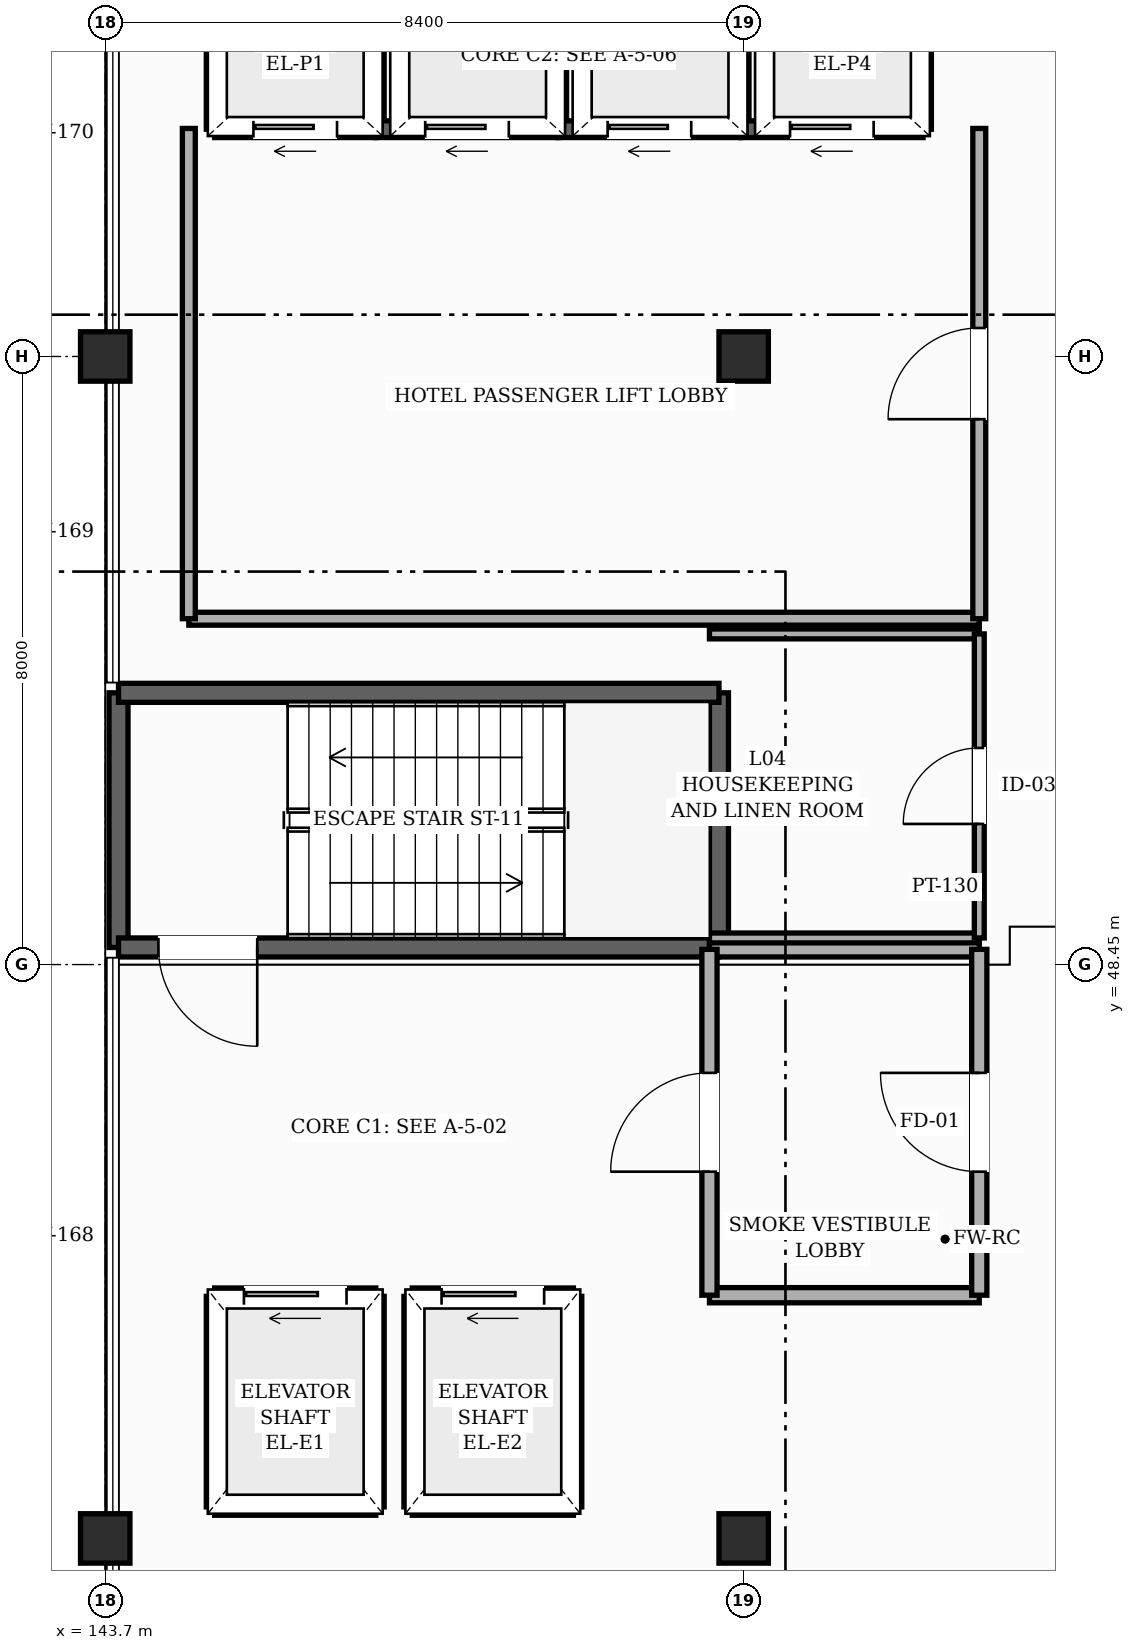
"""IFC4 building model, lengths in metres.
Left out: names, types, materials, properties, quantities, classifications, styles, units other than length and angle.
Written with IfcOpenShell. Run it as: python <this file> out.ifc"""

import sys

from ifc_helpers import new_model, si_unit, direction, frame, frame_2d, origin, origin_2d, place, context, subcontext, project, spatial, rectangle, hollow_rectangle, extrude, element, fill, save


model = new_model("IFC4")
c1 = context("Model", 3, precision=1e-05, world=origin(), true_north=direction((0.0, 1.0)))
c2 = subcontext(c1, "Body", "Model", "MODEL_VIEW")
j1 = project(units=[si_unit("LENGTHUNIT", "METRE"), si_unit("PLANEANGLEUNIT", "RADIAN")], contexts=[c1])
p1 = place(None, origin())
s1 = spatial("IfcSite", under=j1, at=p1, CompositionType="ELEMENT")
p2 = place(p1, origin())
s2 = spatial("IfcBuilding", under=s1, at=p2, CompositionType="ELEMENT")
p3 = place(p2, frame((0.0, 0.0, 19.8)))
s3 = spatial("IfcBuildingStorey", under=s2, at=p3, CompositionType="ELEMENT", Elevation=19.8)
for number, where, z_axis, x_axis in (
    (1, (143.7, 40.9, 0.0), (0.0, 0.0, 1.0), (1.0, 0.0, 0.0)),
    (2, (143.7, 56.45, 0.0), (0.0, 0.0, 1.0), (1.0, 0.0, 0.0)),
    (3, (152.1, 40.9, 0.0), (0.0, 0.0, 1.0), (1.0, 0.0, 0.0)),
    (4, (152.1, 56.45, 0.0), (0.0, 0.0, 1.0), (1.0, 0.0, 0.0)),
):
    element("IfcColumn", number, at=place(p3, frame(where, z_axis=z_axis, x_axis=x_axis)), inside=s3, PredefinedType="COLUMN", context=c2, shape_type="SweptSolid", body=[
        extrude(hollow_rectangle(XDim=0.65, YDim=0.65, WallThickness=0.025, InnerFilletRadius=0.025, OuterFilletRadius=0.05, at=origin_2d()), origin(), (0.0, 0.0, 1.0), 4.8),
    ])
for number, where, z_axis, x_axis in (
    (5, (143.875, 48.675, 0.0), (0.0, 0.0, 1.0), (0.0, 1.0, 0.0)),
    (6, (151.775, 52.025, 0.0), (0.0, 0.0, 1.0), (0.0, -1.0, 0.0)),
):
    element("IfcWall", number, at=place(p3, frame(where, z_axis=z_axis, x_axis=x_axis)), inside=s3, PredefinedType="SHEAR", context=c2, shape_type="SweptSolid", body=[
        extrude(rectangle(XDim=3.35, YDim=0.25, at=frame_2d((1.675, 0.0))), origin(), (0.0, 0.0, 1.0), 4.58),
    ])
p4 = place(p3, frame((151.775, 48.675, 0.0), z_axis=(0.0, 0.0, 1.0), x_axis=(-1.0, 0.0, 0.0)))
e7 = element("IfcWall", 7, at=p4, inside=s3, PredefinedType="SHEAR", context=c2, shape_type="SweptSolid", body=[
    extrude(rectangle(XDim=7.9, YDim=0.25, at=frame_2d((3.95, 0.0))), origin(), (0.0, 0.0, 1.0), 4.58),
])
p5 = place(p4, frame((6.075, 0.0, 0.0)))
e8 = element("IfcOpeningElement", 8, at=p5, cuts=e7, PredefinedType="OPENING", context=c2, shape_type="SweptSolid", body=[
    extrude(rectangle(XDim=1.3, YDim=2.2, at=frame_2d((0.65, 1.1))), frame((0.0, 0.135, 0.0), z_axis=(0.0, -1.0, 0.0), x_axis=(1.0, 0.0, 0.0)), (0.0, 0.0, 1.0), 0.27),
])
p6 = place(p3, frame((143.875, 52.025, 0.0), z_axis=(0.0, 0.0, 1.0), x_axis=(1.0, 0.0, 0.0)))
e9 = element("IfcWall", 9, at=p6, inside=s3, PredefinedType="SHEAR", context=c2, shape_type="SweptSolid", body=[
    extrude(rectangle(XDim=7.9, YDim=0.25, at=frame_2d((3.95, 0.0))), origin(), (0.0, 0.0, 1.0), 4.58),
])
p7 = place(p3, frame((145.14, 44.085, 0.0), z_axis=(0.0, 0.0, 1.0), x_axis=(1.0, 0.0, 0.0)))
e10 = element("IfcWall", 10, at=p7, inside=s3, PredefinedType="SHEAR", context=c2, shape_type="SweptSolid", body=[
    extrude(rectangle(XDim=2.12, YDim=0.22, at=frame_2d((1.06, 0.0))), origin(), (0.0, 0.0, 1.0), 4.58),
])
p8 = place(p7, frame((0.385, 0.0, 0.0)))
e11 = element("IfcOpeningElement", 11, at=p8, cuts=e10, PredefinedType="OPENING", context=c2, shape_type="SweptSolid", body=[
    extrude(rectangle(XDim=1.35, YDim=2.3, at=frame_2d((0.675, 1.15))), frame((0.0, 0.12, 0.0), z_axis=(0.0, -1.0, 0.0), x_axis=(1.0, 0.0, 0.0)), (0.0, 0.0, 1.0), 0.24),
])
p9 = place(p3, frame((145.14, 41.315, 0.0), z_axis=(0.0, 0.0, 1.0), x_axis=(1.0, 0.0, 0.0)))
e12 = element("IfcWall", 12, at=p9, inside=s3, PredefinedType="SHEAR", context=c2, shape_type="SweptSolid", body=[
    extrude(rectangle(XDim=2.12, YDim=0.22, at=frame_2d((1.06, 0.0))), origin(), (0.0, 0.0, 1.0), 4.58),
])
for number, where, z_axis, x_axis in (
    (13, (147.26, 41.315, 0.0), (0.0, 0.0, 1.0), (0.0, 1.0, 0.0)),
    (14, (145.14, 41.315, 0.0), (0.0, 0.0, 1.0), (0.0, 1.0, 0.0)),
):
    element("IfcWall", number, at=place(p3, frame(where, z_axis=z_axis, x_axis=x_axis)), inside=s3, PredefinedType="SHEAR", context=c2, shape_type="SweptSolid", body=[
        extrude(rectangle(XDim=2.77, YDim=0.22, at=frame_2d((1.385, 0.0))), origin(), (0.0, 0.0, 1.0), 4.58),
    ])
p10 = place(p3, frame((147.74, 44.085, 0.0), z_axis=(0.0, 0.0, 1.0), x_axis=(1.0, 0.0, 0.0)))
e15 = element("IfcWall", 15, at=p10, inside=s3, PredefinedType="SHEAR", context=c2, shape_type="SweptSolid", body=[
    extrude(rectangle(XDim=2.12, YDim=0.22, at=frame_2d((1.06, 0.0))), origin(), (0.0, 0.0, 1.0), 4.58),
])
p11 = place(p10, frame((0.385, 0.0, 0.0)))
e16 = element("IfcOpeningElement", 16, at=p11, cuts=e15, PredefinedType="OPENING", context=c2, shape_type="SweptSolid", body=[
    extrude(rectangle(XDim=1.35, YDim=2.3, at=frame_2d((0.675, 1.15))), frame((0.0, 0.12, 0.0), z_axis=(0.0, -1.0, 0.0), x_axis=(1.0, 0.0, 0.0)), (0.0, 0.0, 1.0), 0.24),
])
p12 = place(p3, frame((147.74, 41.315, 0.0), z_axis=(0.0, 0.0, 1.0), x_axis=(1.0, 0.0, 0.0)))
e17 = element("IfcWall", 17, at=p12, inside=s3, PredefinedType="SHEAR", context=c2, shape_type="SweptSolid", body=[
    extrude(rectangle(XDim=2.12, YDim=0.22, at=frame_2d((1.06, 0.0))), origin(), (0.0, 0.0, 1.0), 4.58),
])
for number, where, z_axis, x_axis in (
    (18, (149.86, 41.315, 0.0), (0.0, 0.0, 1.0), (0.0, 1.0, 0.0)),
    (19, (147.74, 41.315, 0.0), (0.0, 0.0, 1.0), (0.0, 1.0, 0.0)),
):
    element("IfcWall", number, at=place(p3, frame(where, z_axis=z_axis, x_axis=x_axis)), inside=s3, PredefinedType="SHEAR", context=c2, shape_type="SweptSolid", body=[
        extrude(rectangle(XDim=2.77, YDim=0.22, at=frame_2d((1.385, 0.0))), origin(), (0.0, 0.0, 1.0), 4.58),
    ])
p13 = place(p3, frame((145.14, 59.44, 0.0), z_axis=(0.0, 0.0, 1.0), x_axis=(1.0, 0.0, 0.0)))
e20 = element("IfcWall", 20, at=p13, inside=s3, PredefinedType="SHEAR", context=c2, shape_type="SweptSolid", body=[
    extrude(rectangle(XDim=2.12, YDim=0.22, at=frame_2d((1.06, 0.0))), origin(), (0.0, 0.0, 1.0), 4.58),
])
p14 = place(p13, frame((0.51, 0.0, 0.0)))
e21 = element("IfcOpeningElement", 21, at=p14, cuts=e20, PredefinedType="OPENING", context=c2, shape_type="SweptSolid", body=[
    extrude(rectangle(XDim=1.1, YDim=2.2, at=frame_2d((0.55, 1.1))), frame((0.0, 0.12, 0.0), z_axis=(0.0, -1.0, 0.0), x_axis=(1.0, 0.0, 0.0)), (0.0, 0.0, 1.0), 0.24),
])
for number, where, z_axis, x_axis in (
    (22, (147.26, 59.44, 0.0), (0.0, 0.0, 1.0), (0.0, 1.0, 0.0)),
    (23, (145.14, 59.44, 0.0), (0.0, 0.0, 1.0), (0.0, 1.0, 0.0)),
):
    element("IfcWall", number, at=place(p3, frame(where, z_axis=z_axis, x_axis=x_axis)), inside=s3, PredefinedType="SHEAR", context=c2, shape_type="SweptSolid", body=[
        extrude(rectangle(XDim=1.92, YDim=0.22, at=frame_2d((0.96, 0.0))), origin(), (0.0, 0.0, 1.0), 4.58),
    ])
p15 = place(p3, frame((147.26, 59.44, 0.0), z_axis=(0.0, 0.0, 1.0), x_axis=(1.0, 0.0, 0.0)))
e24 = element("IfcWall", 24, at=p15, inside=s3, PredefinedType="SHEAR", context=c2, shape_type="SweptSolid", body=[
    extrude(rectangle(XDim=2.4, YDim=0.22, at=frame_2d((1.2, 0.0))), origin(), (0.0, 0.0, 1.0), 4.58),
])
p16 = place(p15, frame((0.65, 0.0, 0.0)))
e25 = element("IfcOpeningElement", 25, at=p16, cuts=e24, PredefinedType="OPENING", context=c2, shape_type="SweptSolid", body=[
    extrude(rectangle(XDim=1.1, YDim=2.2, at=frame_2d((0.55, 1.1))), frame((0.0, 0.12, 0.0), z_axis=(0.0, -1.0, 0.0), x_axis=(1.0, 0.0, 0.0)), (0.0, 0.0, 1.0), 0.24),
])
p17 = place(p3, frame((149.66, 59.44, 0.0), z_axis=(0.0, 0.0, 1.0), x_axis=(0.0, 1.0, 0.0)))
e26 = element("IfcWall", 26, at=p17, inside=s3, PredefinedType="SHEAR", context=c2, shape_type="SweptSolid", body=[
    extrude(rectangle(XDim=1.92, YDim=0.22, at=frame_2d((0.96, 0.0))), origin(), (0.0, 0.0, 1.0), 4.58),
])
p18 = place(p3, frame((149.66, 59.44, 0.0), z_axis=(0.0, 0.0, 1.0), x_axis=(1.0, 0.0, 0.0)))
e27 = element("IfcWall", 27, at=p18, inside=s3, PredefinedType="SHEAR", context=c2, shape_type="SweptSolid", body=[
    extrude(rectangle(XDim=2.4, YDim=0.22, at=frame_2d((1.2, 0.0))), origin(), (0.0, 0.0, 1.0), 4.58),
])
p19 = place(p18, frame((0.65, 0.0, 0.0)))
e28 = element("IfcOpeningElement", 28, at=p19, cuts=e27, PredefinedType="OPENING", context=c2, shape_type="SweptSolid", body=[
    extrude(rectangle(XDim=1.1, YDim=2.2, at=frame_2d((0.55, 1.1))), frame((0.0, 0.12, 0.0), z_axis=(0.0, -1.0, 0.0), x_axis=(1.0, 0.0, 0.0)), (0.0, 0.0, 1.0), 0.24),
])
p20 = place(p3, frame((152.06, 59.44, 0.0), z_axis=(0.0, 0.0, 1.0), x_axis=(0.0, 1.0, 0.0)))
e29 = element("IfcWall", 29, at=p20, inside=s3, PredefinedType="SHEAR", context=c2, shape_type="SweptSolid", body=[
    extrude(rectangle(XDim=1.92, YDim=0.22, at=frame_2d((0.96, 0.0))), origin(), (0.0, 0.0, 1.0), 4.58),
])
p21 = place(p3, frame((152.06, 59.44, 0.0), z_axis=(0.0, 0.0, 1.0), x_axis=(1.0, 0.0, 0.0)))
e30 = element("IfcWall", 30, at=p21, inside=s3, PredefinedType="SHEAR", context=c2, shape_type="SweptSolid", body=[
    extrude(rectangle(XDim=2.4, YDim=0.22, at=frame_2d((1.2, 0.0))), origin(), (0.0, 0.0, 1.0), 4.58),
])
p22 = place(p21, frame((0.65, 0.0, 0.0)))
e31 = element("IfcOpeningElement", 31, at=p22, cuts=e30, PredefinedType="OPENING", context=c2, shape_type="SweptSolid", body=[
    extrude(rectangle(XDim=1.1, YDim=2.2, at=frame_2d((0.55, 1.1))), frame((0.0, 0.12, 0.0), z_axis=(0.0, -1.0, 0.0), x_axis=(1.0, 0.0, 0.0)), (0.0, 0.0, 1.0), 0.24),
])
p23 = place(p3, frame((154.46, 59.44, 0.0), z_axis=(0.0, 0.0, 1.0), x_axis=(0.0, 1.0, 0.0)))
e32 = element("IfcWall", 32, at=p23, inside=s3, PredefinedType="SHEAR", context=c2, shape_type="SweptSolid", body=[
    extrude(rectangle(XDim=1.92, YDim=0.22, at=frame_2d((0.96, 0.0))), origin(), (0.0, 0.0, 1.0), 4.58),
])
for number, where, z_axis, x_axis in (
    (33, (151.65, 44.1, 0.0), (0.0, 0.0, 1.0), (1.0, 0.0, 0.0)),
    (34, (151.65, 48.65, 0.0), (0.0, 0.0, 1.0), (1.0, 0.0, 0.0)),
):
    element("IfcWall", number, at=place(p3, frame(where, z_axis=z_axis, x_axis=x_axis)), inside=s3, PredefinedType="SOLIDWALL", context=c2, shape_type="SweptSolid", body=[
        extrude(rectangle(XDim=3.55, YDim=0.2, at=frame_2d((1.775, 0.0))), origin(), (0.0, 0.0, 1.0), 4.565),
    ])
for number, where, z_axis, x_axis in (
    (35, (151.65, 48.8, 0.0), (0.0, 0.0, 1.0), (1.0, 0.0, 0.0)),
    (36, (151.65, 52.8, 0.0), (0.0, 0.0, 1.0), (1.0, 0.0, 0.0)),
):
    element("IfcWall", number, at=place(p3, frame(where, z_axis=z_axis, x_axis=x_axis)), inside=s3, PredefinedType="PARTITIONING", context=c2, shape_type="SweptSolid", body=[
        extrude(rectangle(XDim=3.55, YDim=0.13, at=frame_2d((1.775, 0.0))), origin(), (0.0, 0.0, 1.0), 4.565),
    ])
p24 = place(p3, frame((144.8, 53.0, 0.0), z_axis=(0.0, 0.0, 1.0), x_axis=(1.0, 0.0, 0.0)))
e37 = element("IfcWall", 37, at=p24, inside=s3, PredefinedType="PARTITIONING", context=c2, shape_type="SweptSolid", body=[
    extrude(rectangle(XDim=10.4, YDim=0.17, at=frame_2d((5.2, 0.0))), origin(), (0.0, 0.0, 1.0), 4.565),
])
p25 = place(p3, frame((144.8, 53.0, 0.0), z_axis=(0.0, 0.0, 1.0), x_axis=(0.0, 1.0, 0.0)))
e38 = element("IfcWall", 38, at=p25, inside=s3, PredefinedType="PARTITIONING", context=c2, shape_type="SweptSolid", body=[
    extrude(rectangle(XDim=6.45, YDim=0.17, at=frame_2d((3.225, 0.0))), origin(), (0.0, 0.0, 1.0), 4.565),
])
p26 = place(p3, frame((151.65, 44.1, 0.0), z_axis=(0.0, 0.0, 1.0), x_axis=(0.0, 1.0, 0.0)))
e39 = element("IfcWall", 39, at=p26, inside=s3, PredefinedType="SOLIDWALL", context=c2, shape_type="SweptSolid", body=[
    extrude(rectangle(XDim=4.55, YDim=0.2, at=frame_2d((2.275, 0.0))), origin(), (0.0, 0.0, 1.0), 4.565),
])
p27 = place(p26, frame((1.625, 0.0, 0.0)))
e40 = element("IfcOpeningElement", 40, at=p27, cuts=e39, PredefinedType="OPENING", context=c2, shape_type="SweptSolid", body=[
    extrude(rectangle(XDim=1.3, YDim=2.2, at=frame_2d((0.65, 1.1))), frame((0.0, 0.11, 0.0), z_axis=(0.0, -1.0, 0.0), x_axis=(1.0, 0.0, 0.0)), (0.0, 0.0, 1.0), 0.22),
])
p28 = place(p3, frame((155.2, 44.1, 0.0), z_axis=(0.0, 0.0, 1.0), x_axis=(0.0, 1.0, 0.0)))
e41 = element("IfcWall", 41, at=p28, inside=s3, PredefinedType="SOLIDWALL", context=c2, shape_type="SweptSolid", body=[
    extrude(rectangle(XDim=4.55, YDim=0.2, at=frame_2d((2.275, 0.0))), origin(), (0.0, 0.0, 1.0), 4.565),
])
p29 = place(p28, frame((1.625, 0.0, 0.0)))
e42 = element("IfcOpeningElement", 42, at=p29, cuts=e41, PredefinedType="OPENING", context=c2, shape_type="SweptSolid", body=[
    extrude(rectangle(XDim=1.3, YDim=2.2, at=frame_2d((0.65, 1.1))), frame((0.0, 0.11, 0.0), z_axis=(0.0, -1.0, 0.0), x_axis=(1.0, 0.0, 0.0)), (0.0, 0.0, 1.0), 0.22),
])
p30 = place(p3, frame((155.2, 48.8, 0.0), z_axis=(0.0, 0.0, 1.0), x_axis=(0.0, 1.0, 0.0)))
e43 = element("IfcWall", 43, at=p30, inside=s3, PredefinedType="PARTITIONING", context=c2, shape_type="SweptSolid", body=[
    extrude(rectangle(XDim=4.0, YDim=0.13, at=frame_2d((2.0, 0.0))), origin(), (0.0, 0.0, 1.0), 4.565),
])
p31 = place(p30, frame((1.5, 0.0, 0.0)))
e44 = element("IfcOpeningElement", 44, at=p31, cuts=e43, PredefinedType="OPENING", context=c2, shape_type="SweptSolid", body=[
    extrude(rectangle(XDim=1.0, YDim=2.18, at=frame_2d((0.5, 1.09))), frame((0.0, 0.075, 0.0), z_axis=(0.0, -1.0, 0.0), x_axis=(1.0, 0.0, 0.0)), (0.0, 0.0, 1.0), 0.15),
])
p32 = place(p3, frame((155.2, 53.0, 0.0), z_axis=(0.0, 0.0, 1.0), x_axis=(0.0, 1.0, 0.0)))
e45 = element("IfcWall", 45, at=p32, inside=s3, PredefinedType="PARTITIONING", context=c2, shape_type="SweptSolid", body=[
    extrude(rectangle(XDim=6.45, YDim=0.17, at=frame_2d((3.225, 0.0))), origin(), (0.0, 0.0, 1.0), 4.565),
])
p33 = place(p32, frame((2.625, 0.0, 0.0)))
e46 = element("IfcOpeningElement", 46, at=p33, cuts=e45, PredefinedType="OPENING", context=c2, shape_type="SweptSolid", body=[
    extrude(rectangle(XDim=1.2, YDim=2.2, at=frame_2d((0.6, 1.1))), frame((0.0, 0.095, 0.0), z_axis=(0.0, -1.0, 0.0), x_axis=(1.0, 0.0, 0.0)), (0.0, 0.0, 1.0), 0.19),
])
p34 = place(p5, origin())
e47 = element("IfcDoor", 47, at=p34, inside=s3, OperationType="SINGLE_SWING_LEFT", PredefinedType="DOOR", context=c2, shape_type="SweptSolid", body=[
    extrude(rectangle(XDim=1.3, YDim=2.2, at=frame_2d((0.65, 1.1))), frame((0.0, 0.025, 0.0), z_axis=(0.0, -1.0, 0.0), x_axis=(1.0, 0.0, 0.0)), (0.0, 0.0, 1.0), 0.05),
])
fill(e8, e47)
p35 = place(p8, origin())
e48 = element("IfcDoor", 48, at=p35, inside=s3, OperationType="SLIDING_TO_LEFT", PredefinedType="DOOR", context=c2, shape_type="SweptSolid", body=[
    extrude(rectangle(XDim=1.35, YDim=2.3, at=frame_2d((0.675, 1.15))), frame((0.0, 0.025, 0.0), z_axis=(0.0, -1.0, 0.0), x_axis=(1.0, 0.0, 0.0)), (0.0, 0.0, 1.0), 0.05),
])
fill(e11, e48)
p36 = place(p11, origin())
e49 = element("IfcDoor", 49, at=p36, inside=s3, OperationType="SLIDING_TO_LEFT", PredefinedType="DOOR", context=c2, shape_type="SweptSolid", body=[
    extrude(rectangle(XDim=1.35, YDim=2.3, at=frame_2d((0.675, 1.15))), frame((0.0, 0.025, 0.0), z_axis=(0.0, -1.0, 0.0), x_axis=(1.0, 0.0, 0.0)), (0.0, 0.0, 1.0), 0.05),
])
fill(e16, e49)
p37 = place(p14, origin())
e50 = element("IfcDoor", 50, at=p37, inside=s3, OperationType="SLIDING_TO_LEFT", PredefinedType="DOOR", context=c2, shape_type="SweptSolid", body=[
    extrude(rectangle(XDim=1.1, YDim=2.2, at=frame_2d((0.55, 1.1))), frame((0.0, 0.025, 0.0), z_axis=(0.0, -1.0, 0.0), x_axis=(1.0, 0.0, 0.0)), (0.0, 0.0, 1.0), 0.05),
])
fill(e21, e50)
p38 = place(p16, origin())
e51 = element("IfcDoor", 51, at=p38, inside=s3, OperationType="SLIDING_TO_LEFT", PredefinedType="DOOR", context=c2, shape_type="SweptSolid", body=[
    extrude(rectangle(XDim=1.1, YDim=2.2, at=frame_2d((0.55, 1.1))), frame((0.0, 0.025, 0.0), z_axis=(0.0, -1.0, 0.0), x_axis=(1.0, 0.0, 0.0)), (0.0, 0.0, 1.0), 0.05),
])
fill(e25, e51)
p39 = place(p19, origin())
e52 = element("IfcDoor", 52, at=p39, inside=s3, OperationType="SLIDING_TO_LEFT", PredefinedType="DOOR", context=c2, shape_type="SweptSolid", body=[
    extrude(rectangle(XDim=1.1, YDim=2.2, at=frame_2d((0.55, 1.1))), frame((0.0, 0.025, 0.0), z_axis=(0.0, -1.0, 0.0), x_axis=(1.0, 0.0, 0.0)), (0.0, 0.0, 1.0), 0.05),
])
fill(e28, e52)
p40 = place(p22, origin())
e53 = element("IfcDoor", 53, at=p40, inside=s3, OperationType="SLIDING_TO_LEFT", PredefinedType="DOOR", context=c2, shape_type="SweptSolid", body=[
    extrude(rectangle(XDim=1.1, YDim=2.2, at=frame_2d((0.55, 1.1))), frame((0.0, 0.025, 0.0), z_axis=(0.0, -1.0, 0.0), x_axis=(1.0, 0.0, 0.0)), (0.0, 0.0, 1.0), 0.05),
])
fill(e31, e53)
p41 = place(p27, origin())
e54 = element("IfcDoor", 54, at=p41, inside=s3, OperationType="SINGLE_SWING_LEFT", PredefinedType="DOOR", context=c2, shape_type="SweptSolid", body=[
    extrude(rectangle(XDim=1.3, YDim=2.2, at=frame_2d((0.65, 1.1))), frame((0.0, 0.025, 0.0), z_axis=(0.0, -1.0, 0.0), x_axis=(1.0, 0.0, 0.0)), (0.0, 0.0, 1.0), 0.05),
])
fill(e40, e54)
p42 = place(p29, origin())
e55 = element("IfcDoor", 55, at=p42, inside=s3, OperationType="SINGLE_SWING_RIGHT", PredefinedType="DOOR", context=c2, shape_type="SweptSolid", body=[
    extrude(rectangle(XDim=1.3, YDim=2.2, at=frame_2d((0.65, 1.1))), frame((0.0, 0.025, 0.0), z_axis=(0.0, -1.0, 0.0), x_axis=(1.0, 0.0, 0.0)), (0.0, 0.0, 1.0), 0.05),
])
fill(e42, e55)
p43 = place(p33, origin())
e56 = element("IfcDoor", 56, at=p43, inside=s3, OperationType="SINGLE_SWING_LEFT", PredefinedType="DOOR", context=c2, shape_type="SweptSolid", body=[
    extrude(rectangle(XDim=1.2, YDim=2.2, at=frame_2d((0.6, 1.1))), frame((0.0, 0.025, 0.0), z_axis=(0.0, -1.0, 0.0), x_axis=(1.0, 0.0, 0.0)), (0.0, 0.0, 1.0), 0.05),
])
fill(e46, e56)
p44 = place(p31, origin())
e57 = element("IfcDoor", 57, at=p44, inside=s3, OperationType="SINGLE_SWING_LEFT", PredefinedType="DOOR", context=c2, shape_type="SweptSolid", body=[
    extrude(rectangle(XDim=1.0, YDim=2.18, at=frame_2d((0.5, 1.09))), frame((0.0, 0.025, 0.0), z_axis=(0.0, -1.0, 0.0), x_axis=(1.0, 0.0, 0.0)), (0.0, 0.0, 1.0), 0.05),
])
fill(e44, e57)
save(model, sys.argv[1])
